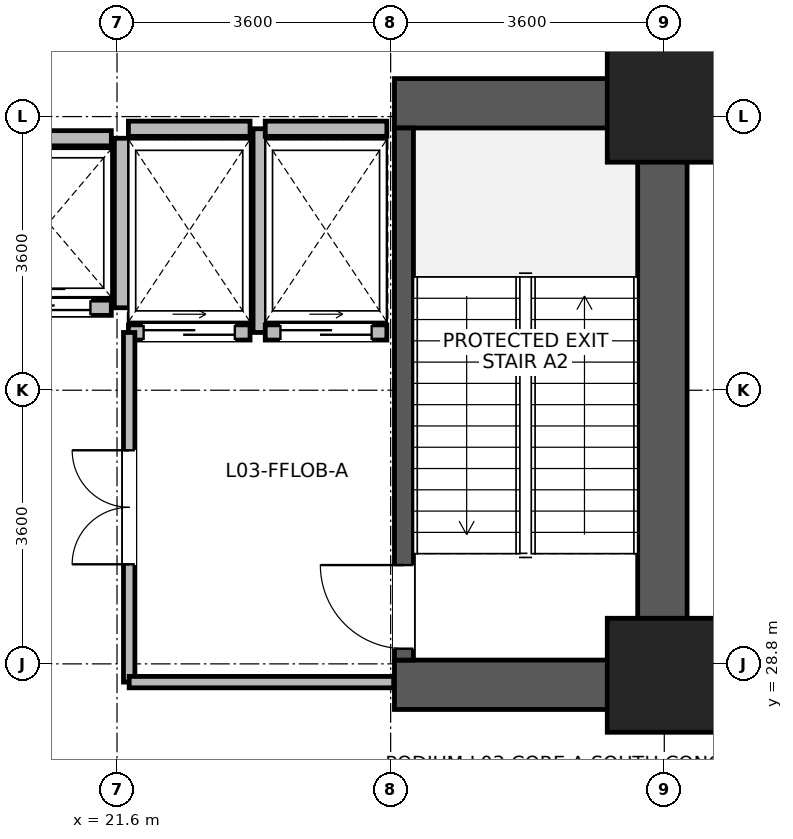
"""IFC4 building model, lengths in metres.
Left out: names, types, materials, properties, quantities, classifications, styles, units other than length and angle.
Written with IfcOpenShell. Run it as: python <this file> out.ifc"""

import sys

from ifc_helpers import new_model, si_unit, direction, frame, frame_2d, origin, origin_2d, place, context, subcontext, project, spatial, rectangle, extrude, source, transform, mapped, element, fill, save


model = new_model("IFC4")
c1 = context("Model", 3, precision=1e-05, world=origin(), true_north=direction((0.0, 1.0)))
c2 = subcontext(c1, "Body", "Model", "MODEL_VIEW")
j1 = project(units=[si_unit("LENGTHUNIT", "METRE"), si_unit("PLANEANGLEUNIT", "RADIAN")], contexts=[c1])
p1 = place(None, origin())
s1 = spatial("IfcSite", under=j1, at=p1, CompositionType="ELEMENT")
p2 = place(p1, origin())
s2 = spatial("IfcBuilding", under=s1, at=p2, CompositionType="ELEMENT")
p3 = place(p2, frame((0.0, 0.0, 15.0)))
s3 = spatial("IfcBuildingStorey", under=s2, at=p3, CompositionType="ELEMENT", Elevation=15.0)
p4 = place(p3, frame((28.775, 28.2, 0.0), z_axis=(0.0, 0.0, 1.0), x_axis=(0.0, 1.0, 0.0)))
e1 = element("IfcWall", 1, at=p4, inside=s3, PredefinedType="SHEAR", context=c2, shape_type="SweptSolid", body=[
    extrude(rectangle(XDim=8.3, YDim=0.65, at=frame_2d((4.15, 0.0))), origin(), (0.0, 0.0, 1.0), 4.38),
])
for number, where, z_axis, x_axis in (
    (2, (25.25, 28.525, 0.0), (0.0, 0.0, 1.0), (1.0, 0.0, 0.0)),
    (3, (25.25, 36.175, 0.0), (0.0, 0.0, 1.0), (1.0, 0.0, 0.0)),
):
    element("IfcWall", number, at=place(p3, frame(where, z_axis=z_axis, x_axis=x_axis)), inside=s3, PredefinedType="SHEAR", context=c2, shape_type="SweptSolid", body=[
        extrude(rectangle(XDim=3.2, YDim=0.65, at=frame_2d((1.6, 0.0))), origin(), (0.0, 0.0, 1.0), 4.38),
    ])
p5 = place(p3, frame((25.375, 28.85, 0.0), z_axis=(0.0, 0.0, 1.0), x_axis=(0.0, 1.0, 0.0)))
e4 = element("IfcWall", 4, at=p5, inside=s3, PredefinedType="SHEAR", context=c2, shape_type="SweptSolid", body=[
    extrude(rectangle(XDim=7.0, YDim=0.25, at=frame_2d((3.5, 0.0))), origin(), (0.0, 0.0, 1.0), 4.38),
])
p6 = place(p5, frame((0.15, 0.0, 0.0)))
e5 = element("IfcOpeningElement", 5, at=p6, cuts=e4, PredefinedType="OPENING", context=c2, shape_type="SweptSolid", body=[
    extrude(rectangle(XDim=1.1, YDim=2.08, at=frame_2d((0.55, 1.04))), frame((0.0, 0.135, 0.0), z_axis=(0.0, -1.0, 0.0), x_axis=(1.0, 0.0, 0.0)), (0.0, 0.0, 1.0), 0.27),
])
m1 = source(origin(), c2, "Body", "SweptSolid", [
    extrude(rectangle(XDim=1.5, YDim=1.5, at=origin_2d()), origin(), (0.0, 0.0, 1.0), 4.8),
])
for number, where, z_axis, x_axis in (
    (6, (28.8, 28.65, 0.0), (0.0, 0.0, 1.0), (1.0, 0.0, 0.0)),
    (7, (28.8, 36.15, 0.0), (0.0, 0.0, 1.0), (1.0, 0.0, 0.0)),
):
    element("IfcColumn", number, at=place(p3, frame(where, z_axis=z_axis, x_axis=x_axis)), inside=s3, PredefinedType="COLUMN", context=c2, shape_type="MappedRepresentation", body=[
        mapped(m1, transform((0.0, 0.0, 0.0), x_axis=(1.0, 0.0, 0.0), y_axis=(0.0, 1.0, 0.0), z_axis=(0.0, 0.0, 1.0), scale=1.0)),
    ])
p7 = place(p3, frame((19.875, 33.485, 0.0), z_axis=(0.0, 0.0, 1.0), x_axis=(1.0, 0.0, 0.0)))
e8 = element("IfcWall", 8, at=p7, inside=s3, PredefinedType="PARTITIONING", context=c2, shape_type="SweptSolid", body=[
    extrude(rectangle(XDim=1.65, YDim=0.2, at=frame_2d((0.825, 0.0))), origin(), (0.0, 0.0, 1.0), 4.36),
])
p8 = place(p7, frame((0.275, 0.0, 0.0)))
e9 = element("IfcOpeningElement", 9, at=p8, cuts=e8, PredefinedType="OPENING", context=c2, shape_type="SweptSolid", body=[
    extrude(rectangle(XDim=1.1, YDim=2.12, at=frame_2d((0.55, 1.06))), frame((0.0, 0.11, 0.0), z_axis=(0.0, -1.0, 0.0), x_axis=(1.0, 0.0, 0.0)), (0.0, 0.0, 1.0), 0.22),
])
p9 = place(p3, frame((19.875, 35.715, 0.0), z_axis=(0.0, 0.0, 1.0), x_axis=(1.0, 0.0, 0.0)))
e10 = element("IfcWall", 10, at=p9, inside=s3, PredefinedType="PARTITIONING", context=c2, shape_type="SweptSolid", body=[
    extrude(rectangle(XDim=1.65, YDim=0.2, at=frame_2d((0.825, 0.0))), origin(), (0.0, 0.0, 1.0), 4.36),
])
p10 = place(p3, frame((21.665, 33.485, 0.0), z_axis=(0.0, 0.0, 1.0), x_axis=(0.0, 1.0, 0.0)))
e11 = element("IfcWall", 11, at=p10, inside=s3, PredefinedType="PARTITIONING", context=c2, shape_type="SweptSolid", body=[
    extrude(rectangle(XDim=2.23, YDim=0.2, at=frame_2d((1.115, 0.0))), origin(), (0.0, 0.0, 1.0), 4.36),
])
p11 = place(p3, frame((21.75, 33.16, 0.0), z_axis=(0.0, 0.0, 1.0), x_axis=(1.0, 0.0, 0.0)))
e12 = element("IfcWall", 12, at=p11, inside=s3, PredefinedType="PARTITIONING", context=c2, shape_type="SweptSolid", body=[
    extrude(rectangle(XDim=1.6, YDim=0.2, at=frame_2d((0.8, 0.0))), origin(), (0.0, 0.0, 1.0), 4.36),
])
p12 = place(p11, frame((0.2, 0.0, 0.0)))
e13 = element("IfcOpeningElement", 13, at=p12, cuts=e12, PredefinedType="OPENING", context=c2, shape_type="SweptSolid", body=[
    extrude(rectangle(XDim=1.2, YDim=2.12, at=frame_2d((0.6, 1.06))), frame((0.0, 0.11, 0.0), z_axis=(0.0, -1.0, 0.0), x_axis=(1.0, 0.0, 0.0)), (0.0, 0.0, 1.0), 0.22),
])
p13 = place(p3, frame((21.75, 35.84, 0.0), z_axis=(0.0, 0.0, 1.0), x_axis=(1.0, 0.0, 0.0)))
e14 = element("IfcWall", 14, at=p13, inside=s3, PredefinedType="PARTITIONING", context=c2, shape_type="SweptSolid", body=[
    extrude(rectangle(XDim=1.6, YDim=0.2, at=frame_2d((0.8, 0.0))), origin(), (0.0, 0.0, 1.0), 3.16),
])
p14 = place(p3, frame((23.49, 33.16, 0.0), z_axis=(0.0, 0.0, 1.0), x_axis=(0.0, 1.0, 0.0)))
e15 = element("IfcWall", 15, at=p14, inside=s3, PredefinedType="PARTITIONING", context=c2, shape_type="SweptSolid", body=[
    extrude(rectangle(XDim=2.68, YDim=0.2, at=frame_2d((1.34, 0.0))), origin(), (0.0, 0.0, 1.0), 4.36),
])
p15 = place(p3, frame((23.55, 33.16, 0.0), z_axis=(0.0, 0.0, 1.0), x_axis=(1.0, 0.0, 0.0)))
e16 = element("IfcWall", 16, at=p15, inside=s3, PredefinedType="PARTITIONING", context=c2, shape_type="SweptSolid", body=[
    extrude(rectangle(XDim=1.6, YDim=0.2, at=frame_2d((0.8, 0.0))), origin(), (0.0, 0.0, 1.0), 4.36),
])
p16 = place(p15, frame((0.2, 0.0, 0.0)))
e17 = element("IfcOpeningElement", 17, at=p16, cuts=e16, PredefinedType="OPENING", context=c2, shape_type="SweptSolid", body=[
    extrude(rectangle(XDim=1.2, YDim=2.12, at=frame_2d((0.6, 1.06))), frame((0.0, 0.11, 0.0), z_axis=(0.0, -1.0, 0.0), x_axis=(1.0, 0.0, 0.0)), (0.0, 0.0, 1.0), 0.22),
])
p17 = place(p3, frame((23.55, 35.84, 0.0), z_axis=(0.0, 0.0, 1.0), x_axis=(1.0, 0.0, 0.0)))
e18 = element("IfcWall", 18, at=p17, inside=s3, PredefinedType="PARTITIONING", context=c2, shape_type="SweptSolid", body=[
    extrude(rectangle(XDim=1.6, YDim=0.2, at=frame_2d((0.8, 0.0))), origin(), (0.0, 0.0, 1.0), 3.16),
])
p18 = place(p3, frame((21.76, 28.56, 0.0), z_axis=(0.0, 0.0, 1.0), x_axis=(0.0, 1.0, 0.0)))
e19 = element("IfcWall", 19, at=p18, inside=s3, PredefinedType="PARTITIONING", context=c2, shape_type="SweptSolid", body=[
    extrude(rectangle(XDim=4.6, YDim=0.15, at=frame_2d((2.3, 0.0))), origin(), (0.0, 0.0, 1.0), 4.36),
])
p19 = place(p18, frame((1.55, 0.0, 0.0)))
e20 = element("IfcOpeningElement", 20, at=p19, cuts=e19, PredefinedType="OPENING", context=c2, shape_type="SweptSolid", body=[
    extrude(rectangle(XDim=1.5, YDim=2.1, at=frame_2d((0.75, 1.05))), frame((0.0, 0.085, 0.0), z_axis=(0.0, -1.0, 0.0), x_axis=(1.0, 0.0, 0.0)), (0.0, 0.0, 1.0), 0.17),
])
p20 = place(p3, frame((21.76, 28.56, 0.0), z_axis=(0.0, 0.0, 1.0), x_axis=(1.0, 0.0, 0.0)))
e21 = element("IfcWall", 21, at=p20, inside=s3, PredefinedType="PARTITIONING", context=c2, shape_type="SweptSolid", body=[
    extrude(rectangle(XDim=3.48, YDim=0.15, at=frame_2d((1.74, 0.0))), origin(), (0.0, 0.0, 1.0), 3.16),
])
p21 = place(p6, origin())
e22 = element("IfcDoor", 22, at=p21, inside=s3, OperationType="SINGLE_SWING_RIGHT", PredefinedType="DOOR", context=c2, shape_type="SweptSolid", body=[
    extrude(rectangle(XDim=1.1, YDim=2.08, at=frame_2d((0.55, 1.04))), frame((0.0, 0.025, 0.0), z_axis=(0.0, -1.0, 0.0), x_axis=(1.0, 0.0, 0.0)), (0.0, 0.0, 1.0), 0.05),
])
fill(e5, e22)
p22 = place(p8, origin())
e23 = element("IfcDoor", 23, at=p22, inside=s3, OperationType="SLIDING_TO_LEFT", PredefinedType="DOOR", context=c2, shape_type="SweptSolid", body=[
    extrude(rectangle(XDim=1.1, YDim=2.12, at=frame_2d((0.55, 1.06))), frame((0.0, 0.025, 0.0), z_axis=(0.0, -1.0, 0.0), x_axis=(1.0, 0.0, 0.0)), (0.0, 0.0, 1.0), 0.05),
])
fill(e9, e23)
p23 = place(p12, origin())
e24 = element("IfcDoor", 24, at=p23, inside=s3, OperationType="SLIDING_TO_RIGHT", PredefinedType="DOOR", context=c2, shape_type="SweptSolid", body=[
    extrude(rectangle(XDim=1.2, YDim=2.12, at=frame_2d((0.6, 1.06))), frame((0.0, 0.025, 0.0), z_axis=(0.0, -1.0, 0.0), x_axis=(1.0, 0.0, 0.0)), (0.0, 0.0, 1.0), 0.05),
])
fill(e13, e24)
p24 = place(p16, origin())
e25 = element("IfcDoor", 25, at=p24, inside=s3, OperationType="SLIDING_TO_RIGHT", PredefinedType="DOOR", context=c2, shape_type="SweptSolid", body=[
    extrude(rectangle(XDim=1.2, YDim=2.12, at=frame_2d((0.6, 1.06))), frame((0.0, 0.025, 0.0), z_axis=(0.0, -1.0, 0.0), x_axis=(1.0, 0.0, 0.0)), (0.0, 0.0, 1.0), 0.05),
])
fill(e17, e25)
p25 = place(p19, origin())
e26 = element("IfcDoor", 26, at=p25, inside=s3, OperationType="DOUBLE_DOOR_SINGLE_SWING", PredefinedType="DOOR", context=c2, shape_type="SweptSolid", body=[
    extrude(rectangle(XDim=1.5, YDim=2.1, at=frame_2d((0.75, 1.05))), frame((0.0, 0.025, 0.0), z_axis=(0.0, -1.0, 0.0), x_axis=(1.0, 0.0, 0.0)), (0.0, 0.0, 1.0), 0.05),
])
fill(e20, e26)
save(model, sys.argv[1])
